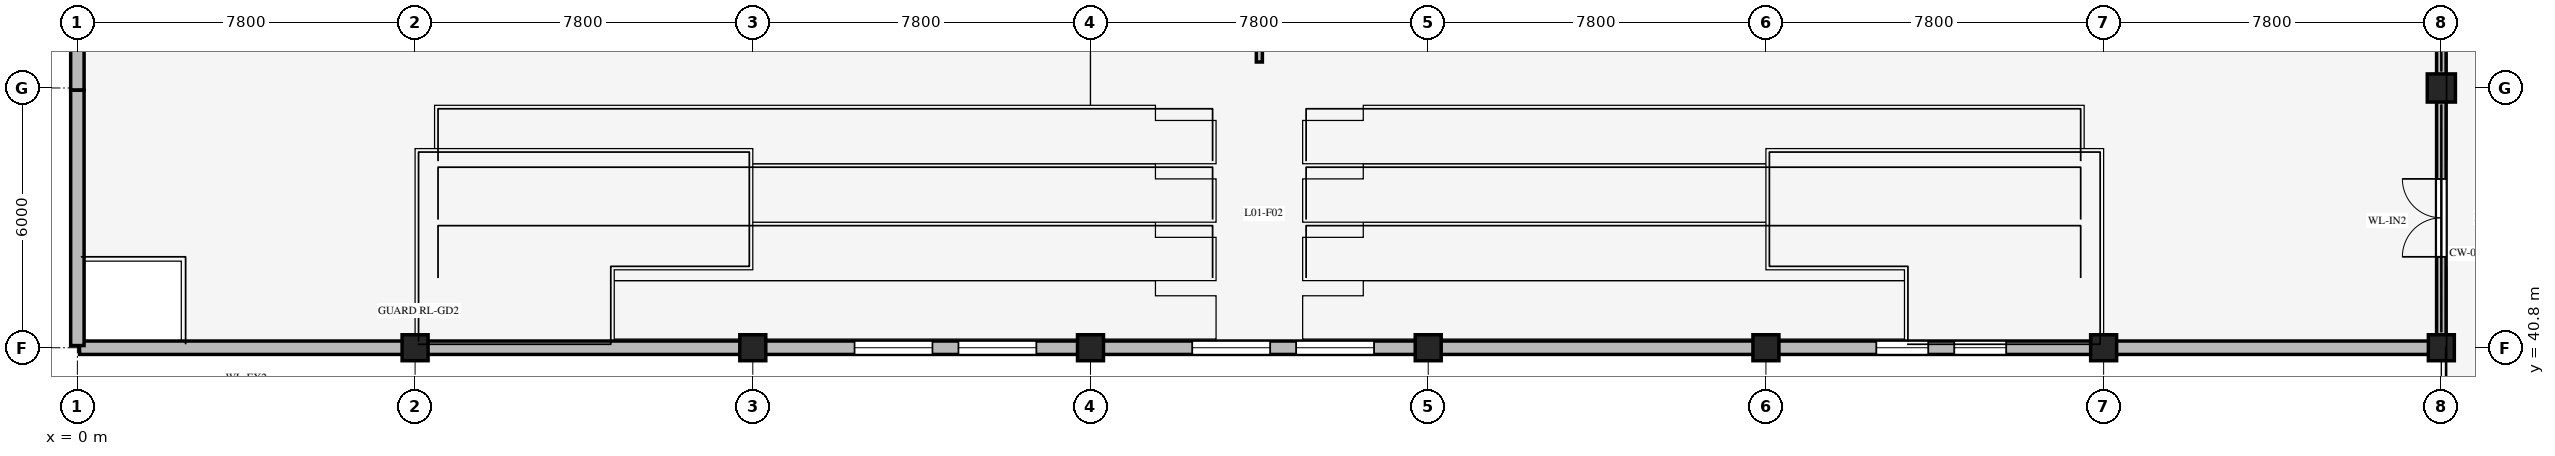
"""IFC4 building model, lengths in metres.
Left out: names, types, materials, properties, quantities, classifications, styles, units other than length and angle.
Written with IfcOpenShell. Run it as: python <this file> out.ifc"""

import sys

from ifc_helpers import new_model, si_unit, direction, frame, frame_2d, origin, origin_2d, place, context, subcontext, project, spatial, rectangle, extrude, element, fill, save


model = new_model("IFC4")
c1 = context("Model", 3, precision=1e-05, world=origin(), true_north=direction((0.0, 1.0)))
c2 = subcontext(c1, "Body", "Model", "MODEL_VIEW")
j1 = project(units=[si_unit("LENGTHUNIT", "METRE"), si_unit("PLANEANGLEUNIT", "RADIAN")], contexts=[c1])
p1 = place(None, origin())
s1 = spatial("IfcSite", under=j1, at=p1, CompositionType="ELEMENT")
p2 = place(p1, origin())
s2 = spatial("IfcBuilding", under=s1, at=p2, CompositionType="ELEMENT")
p3 = place(p2, frame((0.0, 0.0, 6.0)))
s3 = spatial("IfcBuildingStorey", under=s2, at=p3, CompositionType="ELEMENT", Elevation=6.0)
for number, where, z_axis, x_axis in (
    (1, (7.8, 40.8, 0.0), (0.0, 0.0, 1.0), (1.0, 0.0, 0.0)),
    (2, (15.6, 40.8, 0.0), (0.0, 0.0, 1.0), (1.0, 0.0, 0.0)),
    (3, (23.4, 40.8, 0.0), (0.0, 0.0, 1.0), (1.0, 0.0, 0.0)),
    (4, (31.2, 40.8, 0.0), (0.0, 0.0, 1.0), (1.0, 0.0, 0.0)),
    (5, (39.0, 40.8, 0.0), (0.0, 0.0, 1.0), (1.0, 0.0, 0.0)),
    (6, (46.8, 40.8, 0.0), (0.0, 0.0, 1.0), (1.0, 0.0, 0.0)),
    (7, (54.6, 40.8, 0.0), (0.0, 0.0, 1.0), (1.0, 0.0, 0.0)),
):
    element("IfcColumn", number, at=place(p3, frame(where, z_axis=z_axis, x_axis=x_axis)), inside=s3, PredefinedType="COLUMN", context=c2, shape_type="SweptSolid", body=[
        extrude(rectangle(XDim=0.6, YDim=0.6, at=origin_2d()), origin(), (0.0, 0.0, 1.0), 6.0),
    ])
p4 = place(p3, frame((54.6, 46.8, 0.0), z_axis=(0.0, 0.0, 1.0), x_axis=(1.0, 0.0, 0.0)))
e8 = element("IfcColumn", 8, at=p4, inside=s3, PredefinedType="COLUMN", context=c2, shape_type="SweptSolid", body=[
    extrude(rectangle(XDim=0.65, YDim=0.65, at=origin_2d()), origin(), (0.0, 0.0, 1.0), 6.0),
])
p5 = place(p3, frame((7.75, 40.8, 0.0), z_axis=(0.0, 0.0, 1.0), x_axis=(-1.0, 0.0, 0.0)))
e9 = element("IfcWall", 9, at=p5, inside=s3, PredefinedType="STANDARD", context=c2, shape_type="SweptSolid", body=[
    extrude(rectangle(XDim=7.7, YDim=0.31, at=frame_2d((3.85, 0.0))), origin(), (0.0, 0.0, 1.0), 8.435),
])
p6 = place(p3, frame((15.55, 40.8, 0.0), z_axis=(0.0, 0.0, 1.0), x_axis=(-1.0, 0.0, 0.0)))
e10 = element("IfcWall", 10, at=p6, inside=s3, PredefinedType="STANDARD", context=c2, shape_type="SweptSolid", body=[
    extrude(rectangle(XDim=7.795, YDim=0.31, at=frame_2d((3.897, 0.0))), origin(), (0.0, 0.0, 1.0), 5.475),
])
p7 = place(p3, frame((23.35, 40.8, 0.0), z_axis=(0.0, 0.0, 1.0), x_axis=(-1.0, 0.0, 0.0)))
e11 = element("IfcWall", 11, at=p7, inside=s3, PredefinedType="STANDARD", context=c2, shape_type="SweptSolid", body=[
    extrude(rectangle(XDim=7.795, YDim=0.31, at=frame_2d((3.897, 0.0))), origin(), (0.0, 0.0, 1.0), 8.435),
])
p8 = place(p7, frame((1.2, 0.0, 1.05)))
e12 = element("IfcOpeningElement", 12, at=p8, cuts=e11, PredefinedType="OPENING", context=c2, shape_type="SweptSolid", body=[
    extrude(rectangle(XDim=1.8, YDim=1.8, at=frame_2d((0.9, 0.9))), frame((0.0, 0.165, 0.0), z_axis=(0.0, -1.0, 0.0), x_axis=(1.0, 0.0, 0.0)), (0.0, 0.0, 1.0), 0.33),
])
p9 = place(p7, frame((3.6, 0.0, 1.05)))
e13 = element("IfcOpeningElement", 13, at=p9, cuts=e11, PredefinedType="OPENING", context=c2, shape_type="SweptSolid", body=[
    extrude(rectangle(XDim=1.8, YDim=1.8, at=frame_2d((0.9, 0.9))), frame((0.0, 0.165, 0.0), z_axis=(0.0, -1.0, 0.0), x_axis=(1.0, 0.0, 0.0)), (0.0, 0.0, 1.0), 0.33),
])
p10 = place(p3, frame((31.15, 40.8, 0.0), z_axis=(0.0, 0.0, 1.0), x_axis=(-1.0, 0.0, 0.0)))
e14 = element("IfcWall", 14, at=p10, inside=s3, PredefinedType="STANDARD", context=c2, shape_type="SweptSolid", body=[
    extrude(rectangle(XDim=7.795, YDim=0.31, at=frame_2d((3.897, 0.0))), origin(), (0.0, 0.0, 1.0), 8.435),
])
p11 = place(p10, frame((1.2, 0.0, 1.05)))
e15 = element("IfcOpeningElement", 15, at=p11, cuts=e14, PredefinedType="OPENING", context=c2, shape_type="SweptSolid", body=[
    extrude(rectangle(XDim=1.8, YDim=1.8, at=frame_2d((0.9, 0.9))), frame((0.0, 0.165, 0.0), z_axis=(0.0, -1.0, 0.0), x_axis=(1.0, 0.0, 0.0)), (0.0, 0.0, 1.0), 0.33),
])
p12 = place(p10, frame((3.6, 0.0, 1.05)))
e16 = element("IfcOpeningElement", 16, at=p12, cuts=e14, PredefinedType="OPENING", context=c2, shape_type="SweptSolid", body=[
    extrude(rectangle(XDim=1.8, YDim=1.8, at=frame_2d((0.9, 0.9))), frame((0.0, 0.165, 0.0), z_axis=(0.0, -1.0, 0.0), x_axis=(1.0, 0.0, 0.0)), (0.0, 0.0, 1.0), 0.33),
])
p13 = place(p3, frame((38.95, 40.8, 0.0), z_axis=(0.0, 0.0, 1.0), x_axis=(-1.0, 0.0, 0.0)))
e17 = element("IfcWall", 17, at=p13, inside=s3, PredefinedType="STANDARD", context=c2, shape_type="SweptSolid", body=[
    extrude(rectangle(XDim=7.795, YDim=0.31, at=frame_2d((3.897, 0.0))), origin(), (0.0, 0.0, 1.0), 8.435),
])
p14 = place(p3, frame((46.75, 40.8, 0.0), z_axis=(0.0, 0.0, 1.0), x_axis=(-1.0, 0.0, 0.0)))
e18 = element("IfcWall", 18, at=p14, inside=s3, PredefinedType="STANDARD", context=c2, shape_type="SweptSolid", body=[
    extrude(rectangle(XDim=7.795, YDim=0.31, at=frame_2d((3.897, 0.0))), origin(), (0.0, 0.0, 1.0), 5.475),
])
p15 = place(p14, frame((2.2, 0.0, 1.2)))
e19 = element("IfcOpeningElement", 19, at=p15, cuts=e18, PredefinedType="OPENING", context=c2, shape_type="SweptSolid", body=[
    extrude(rectangle(XDim=1.2, YDim=2.4, at=frame_2d((0.6, 1.2))), frame((0.0, 0.165, 0.0), z_axis=(0.0, -1.0, 0.0), x_axis=(1.0, 0.0, 0.0)), (0.0, 0.0, 1.0), 0.33),
])
p16 = place(p14, frame((4.0, 0.0, 1.2)))
e20 = element("IfcOpeningElement", 20, at=p16, cuts=e18, PredefinedType="OPENING", context=c2, shape_type="SweptSolid", body=[
    extrude(rectangle(XDim=1.2, YDim=2.4, at=frame_2d((0.6, 1.2))), frame((0.0, 0.165, 0.0), z_axis=(0.0, -1.0, 0.0), x_axis=(1.0, 0.0, 0.0)), (0.0, 0.0, 1.0), 0.33),
])
p17 = place(p3, frame((54.55, 40.8, 0.0), z_axis=(0.0, 0.0, 1.0), x_axis=(-1.0, 0.0, 0.0)))
e21 = element("IfcWall", 21, at=p17, inside=s3, PredefinedType="STANDARD", context=c2, shape_type="SweptSolid", body=[
    extrude(rectangle(XDim=7.795, YDim=0.31, at=frame_2d((3.897, 0.0))), origin(), (0.0, 0.0, 1.0), 8.435),
])
p18 = place(p3, frame((0.0, 46.75, 0.0), z_axis=(0.0, 0.0, 1.0), x_axis=(0.0, -1.0, 0.0)))
e22 = element("IfcWall", 22, at=p18, inside=s3, PredefinedType="STANDARD", context=c2, shape_type="SweptSolid", body=[
    extrude(rectangle(XDim=5.9, YDim=0.31, at=frame_2d((2.95, 0.0))), origin(), (0.0, 0.0, 1.0), 9.6),
])
p19 = place(p3, frame((0.0, 54.55, 0.0), z_axis=(0.0, 0.0, 1.0), x_axis=(0.0, -1.0, 0.0)))
e23 = element("IfcWall", 23, at=p19, inside=s3, PredefinedType="STANDARD", context=c2, shape_type="SweptSolid", body=[
    extrude(rectangle(XDim=7.795, YDim=0.31, at=frame_2d((3.897, 0.0))), origin(), (0.0, 0.0, 1.0), 9.6),
])
p20 = place(p19, frame((1.1, 0.0, 2.8)))
e24 = element("IfcOpeningElement", 24, at=p20, cuts=e23, PredefinedType="OPENING", context=c2, shape_type="SweptSolid", body=[
    extrude(rectangle(XDim=1.8, YDim=1.8, at=frame_2d((0.9, 0.9))), frame((0.0, 0.165, 0.0), z_axis=(0.0, -1.0, 0.0), x_axis=(1.0, 0.0, 0.0)), (0.0, 0.0, 1.0), 0.33),
])
p21 = place(p19, frame((3.5, 0.0, 4.8)))
e25 = element("IfcOpeningElement", 25, at=p21, cuts=e23, PredefinedType="OPENING", context=c2, shape_type="SweptSolid", body=[
    extrude(rectangle(XDim=1.2, YDim=2.4, at=frame_2d((0.6, 1.2))), frame((0.0, 0.165, 0.0), z_axis=(0.0, -1.0, 0.0), x_axis=(1.0, 0.0, 0.0)), (0.0, 0.0, 1.0), 0.33),
])
p22 = place(p3, frame((54.6, 40.96, 0.0), z_axis=(0.0, 0.0, 1.0), x_axis=(0.0, 1.0, 0.0)))
e26 = element("IfcWall", 26, at=p22, inside=s3, PredefinedType="STANDARD", context=c2, shape_type="SweptSolid", body=[
    extrude(rectangle(XDim=5.54, YDim=0.22, at=frame_2d((2.77, 0.0))), origin(), (0.0, 0.0, 1.0), 3.15),
])
p23 = place(p22, frame((1.94, 0.0, 0.0)))
e27 = element("IfcOpeningElement", 27, at=p23, cuts=e26, PredefinedType="OPENING", context=c2, shape_type="SweptSolid", body=[
    extrude(rectangle(XDim=1.8, YDim=2.3, at=frame_2d((0.9, 1.15))), frame((0.0, 0.12, 0.0), z_axis=(0.0, -1.0, 0.0), x_axis=(1.0, 0.0, 0.0)), (0.0, 0.0, 1.0), 0.24),
])
p24 = place(p3, frame((54.6, 47.1, 0.0), z_axis=(0.0, 0.0, 1.0), x_axis=(0.0, 1.0, 0.0)))
e28 = element("IfcWall", 28, at=p24, inside=s3, PredefinedType="STANDARD", context=c2, shape_type="SweptSolid", body=[
    extrude(rectangle(XDim=7.2, YDim=0.22, at=frame_2d((3.6, 0.0))), origin(), (0.0, 0.0, 1.0), 3.15),
])
p25 = place(p24, frame((2.7, 0.0, 0.0)))
e29 = element("IfcOpeningElement", 29, at=p25, cuts=e28, PredefinedType="OPENING", context=c2, shape_type="SweptSolid", body=[
    extrude(rectangle(XDim=1.8, YDim=2.3, at=frame_2d((0.9, 1.15))), frame((0.0, 0.12, 0.0), z_axis=(0.0, -1.0, 0.0), x_axis=(1.0, 0.0, 0.0)), (0.0, 0.0, 1.0), 0.24),
])
p26 = place(p3, frame((27.3, 47.4, 0.0), z_axis=(0.0, 0.0, 1.0), x_axis=(0.0, 1.0, 0.0)))
e30 = element("IfcWall", 30, at=p26, inside=s3, PredefinedType="MOVABLE", context=c2, shape_type="SweptSolid", body=[
    extrude(rectangle(XDim=6.6, YDim=0.14, at=frame_2d((3.3, 0.0))), origin(), (0.0, 0.0, 1.0), 3.15),
])
p27 = place(p8, origin())
e31 = element("IfcWindow", 31, at=p27, inside=s3, PartitioningType="SINGLE_PANEL", PredefinedType="WINDOW", context=c2, shape_type="SweptSolid", body=[
    extrude(rectangle(XDim=1.8, YDim=1.8, at=frame_2d((0.9, 0.9))), frame((0.0, 0.03, 0.0), z_axis=(0.0, -1.0, 0.0), x_axis=(1.0, 0.0, 0.0)), (0.0, 0.0, 1.0), 0.06),
])
fill(e12, e31)
p28 = place(p9, origin())
e32 = element("IfcWindow", 32, at=p28, inside=s3, PartitioningType="SINGLE_PANEL", PredefinedType="WINDOW", context=c2, shape_type="SweptSolid", body=[
    extrude(rectangle(XDim=1.8, YDim=1.8, at=frame_2d((0.9, 0.9))), frame((0.0, 0.03, 0.0), z_axis=(0.0, -1.0, 0.0), x_axis=(1.0, 0.0, 0.0)), (0.0, 0.0, 1.0), 0.06),
])
fill(e13, e32)
p29 = place(p11, origin())
e33 = element("IfcWindow", 33, at=p29, inside=s3, PartitioningType="SINGLE_PANEL", PredefinedType="WINDOW", context=c2, shape_type="SweptSolid", body=[
    extrude(rectangle(XDim=1.8, YDim=1.8, at=frame_2d((0.9, 0.9))), frame((0.0, 0.03, 0.0), z_axis=(0.0, -1.0, 0.0), x_axis=(1.0, 0.0, 0.0)), (0.0, 0.0, 1.0), 0.06),
])
fill(e15, e33)
p30 = place(p12, origin())
e34 = element("IfcWindow", 34, at=p30, inside=s3, PartitioningType="SINGLE_PANEL", PredefinedType="WINDOW", context=c2, shape_type="SweptSolid", body=[
    extrude(rectangle(XDim=1.8, YDim=1.8, at=frame_2d((0.9, 0.9))), frame((0.0, 0.03, 0.0), z_axis=(0.0, -1.0, 0.0), x_axis=(1.0, 0.0, 0.0)), (0.0, 0.0, 1.0), 0.06),
])
fill(e16, e34)
p31 = place(p15, origin())
e35 = element("IfcWindow", 35, at=p31, inside=s3, PartitioningType="SINGLE_PANEL", PredefinedType="WINDOW", context=c2, shape_type="SweptSolid", body=[
    extrude(rectangle(XDim=1.2, YDim=2.4, at=frame_2d((0.6, 1.2))), frame((0.0, 0.03, 0.0), z_axis=(0.0, -1.0, 0.0), x_axis=(1.0, 0.0, 0.0)), (0.0, 0.0, 1.0), 0.06),
])
fill(e19, e35)
p32 = place(p16, origin())
e36 = element("IfcWindow", 36, at=p32, inside=s3, PartitioningType="SINGLE_PANEL", PredefinedType="WINDOW", context=c2, shape_type="SweptSolid", body=[
    extrude(rectangle(XDim=1.2, YDim=2.4, at=frame_2d((0.6, 1.2))), frame((0.0, 0.03, 0.0), z_axis=(0.0, -1.0, 0.0), x_axis=(1.0, 0.0, 0.0)), (0.0, 0.0, 1.0), 0.06),
])
fill(e20, e36)
p33 = place(p23, origin())
e37 = element("IfcDoor", 37, at=p33, inside=s3, OperationType="DOUBLE_DOOR_SINGLE_SWING", PredefinedType="DOOR", context=c2, shape_type="SweptSolid", body=[
    extrude(rectangle(XDim=1.8, YDim=2.3, at=frame_2d((0.9, 1.15))), frame((0.0, 0.025, 0.0), z_axis=(0.0, -1.0, 0.0), x_axis=(1.0, 0.0, 0.0)), (0.0, 0.0, 1.0), 0.05),
])
fill(e27, e37)
save(model, sys.argv[1])
